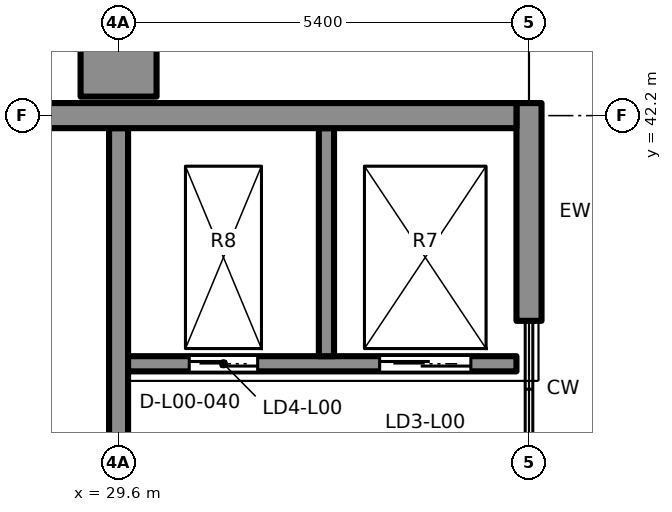
"""IFC4 building model, lengths in metres.
Left out: names, types, materials, properties, quantities, classifications, styles, units other than length and angle.
Written with IfcOpenShell. Run it as: python <this file> out.ifc"""

import sys

from ifc_helpers import new_model, si_unit, direction, frame, frame_2d, origin, place, context, subcontext, project, spatial, rectangle, extrude, element, fill, save


model = new_model("IFC4")
c1 = context("Model", 3, precision=1e-05, world=origin(), true_north=direction((0.0, 1.0)))
c2 = subcontext(c1, "Body", "Model", "MODEL_VIEW")
j1 = project(units=[si_unit("LENGTHUNIT", "METRE"), si_unit("PLANEANGLEUNIT", "RADIAN")], contexts=[c1])
p1 = place(None, origin())
s1 = spatial("IfcSite", under=j1, at=p1, CompositionType="ELEMENT")
p2 = place(p1, origin())
s2 = spatial("IfcBuilding", under=s1, at=p2, CompositionType="ELEMENT")
p3 = place(p2, origin())
s3 = spatial("IfcBuildingStorey", under=s2, at=p3, CompositionType="ELEMENT", Elevation=0.0)
p4 = place(p3, frame((29.6, 35.25, -1.4), z_axis=(0.0, 0.0, 1.0), x_axis=(0.0, 1.0, 0.0)))
e1 = element("IfcWall", 1, at=p4, inside=s3, PredefinedType="SHEAR", context=c2, shape_type="SweptSolid", body=[
    extrude(rectangle(XDim=6.785, YDim=0.25, at=frame_2d((3.393, 0.0))), origin(), (0.0, 0.0, 1.0), 7.45),
])
p5 = place(p4, frame((0.83, 0.0, 1.4)))
e2 = element("IfcOpeningElement", 2, at=p5, cuts=e1, PredefinedType="OPENING", context=c2, shape_type="SweptSolid", body=[
    extrude(rectangle(XDim=1.8, YDim=2.1, at=frame_2d((0.9, 1.05))), frame((0.0, 0.135, 0.0), z_axis=(0.0, -1.0, 0.0), x_axis=(1.0, 0.0, 0.0)), (0.0, 0.0, 1.0), 0.27),
])
p6 = place(p3, frame((29.725, 38.935, -1.4), z_axis=(0.0, 0.0, 1.0), x_axis=(1.0, 0.0, 0.0)))
e3 = element("IfcWall", 3, at=p6, inside=s3, PredefinedType="SHEAR", context=c2, shape_type="SweptSolid", body=[
    extrude(rectangle(XDim=5.11, YDim=0.2, at=frame_2d((2.555, 0.0))), origin(), (0.0, 0.0, 1.0), 7.45),
])
p7 = place(p6, frame((3.31, 0.0, 1.4)))
e4 = element("IfcOpeningElement", 4, at=p7, cuts=e3, PredefinedType="OPENING", context=c2, shape_type="SweptSolid", body=[
    extrude(rectangle(XDim=1.2, YDim=2.1, at=frame_2d((0.6, 1.05))), frame((0.0, 0.11, 0.0), z_axis=(0.0, -1.0, 0.0), x_axis=(1.0, 0.0, 0.0)), (0.0, 0.0, 1.0), 0.22),
])
p8 = place(p6, frame((0.805, 0.0, 1.4)))
e5 = element("IfcOpeningElement", 5, at=p8, cuts=e3, PredefinedType="OPENING", context=c2, shape_type="SweptSolid", body=[
    extrude(rectangle(XDim=0.9, YDim=2.1, at=frame_2d((0.45, 1.05))), frame((0.0, 0.11, 0.0), z_axis=(0.0, -1.0, 0.0), x_axis=(1.0, 0.0, 0.0)), (0.0, 0.0, 1.0), 0.22),
])
p9 = place(p3, frame((32.335, 42.035, -1.4), z_axis=(0.0, 0.0, 1.0), x_axis=(0.0, -1.0, 0.0)))
e6 = element("IfcWall", 6, at=p9, inside=s3, PredefinedType="SHEAR", context=c2, shape_type="SweptSolid", body=[
    extrude(rectangle(XDim=3.0, YDim=0.2, at=frame_2d((1.5, 0.0))), origin(), (0.0, 0.0, 1.0), 7.45),
])
p10 = place(p3, frame((29.725, 42.2, -1.4), z_axis=(0.0, 0.0, 1.0), x_axis=(1.0, 0.0, 0.0)))
e7 = element("IfcWall", 7, at=p10, inside=s3, PredefinedType="SHEAR", context=c2, shape_type="SweptSolid", body=[
    extrude(rectangle(XDim=5.11, YDim=0.25, at=frame_2d((2.555, 0.0))), origin(), (0.0, 0.0, 1.0), 1.4),
])
p11 = place(p3, frame((35.0, 38.835, -1.4), z_axis=(0.0, 0.0, 1.0), x_axis=(0.0, 1.0, 0.0)))
e8 = element("IfcWall", 8, at=p11, inside=s3, PredefinedType="SHEAR", context=c2, shape_type="SweptSolid", body=[
    extrude(rectangle(XDim=3.365, YDim=0.25, at=frame_2d((1.683, 0.0))), origin(), (0.0, 0.0, 1.0), 1.4),
])
p12 = place(p3, frame((35.0, 42.365, 0.0), z_axis=(0.0, 0.0, 1.0), x_axis=(0.0, -1.0, 0.0)))
e9 = element("IfcWall", 9, at=p12, inside=s3, PredefinedType="SOLIDWALL", context=c2, shape_type="SweptSolid", body=[
    extrude(rectangle(XDim=2.865, YDim=0.33, at=frame_2d((1.433, 0.0))), origin(), (0.0, 0.0, 1.0), 5.25),
])
p13 = place(p3, frame((23.92, 42.2, 0.0), z_axis=(0.0, 0.0, 1.0), x_axis=(1.0, 0.0, 0.0)))
e10 = element("IfcWall", 10, at=p13, inside=s3, PredefinedType="SOLIDWALL", context=c2, shape_type="SweptSolid", body=[
    extrude(rectangle(XDim=10.915, YDim=0.33, at=frame_2d((5.458, 0.0))), origin(), (0.0, 0.0, 1.0), 5.5),
])
p14 = place(p13, frame((3.28, 0.0, 0.0)))
e11 = element("IfcOpeningElement", 11, at=p14, cuts=e10, PredefinedType="OPENING", context=c2, shape_type="SweptSolid", body=[
    extrude(rectangle(XDim=1.2, YDim=2.1, at=frame_2d((0.6, 1.05))), frame((0.0, 0.175, 0.0), z_axis=(0.0, -1.0, 0.0), x_axis=(1.0, 0.0, 0.0)), (0.0, 0.0, 1.0), 0.35),
])
p15 = place(p3, frame((29.1, 42.825, 0.0), z_axis=(0.0, 0.0, 1.0), x_axis=(1.0, 0.0, 0.0)))
e12 = element("IfcWall", 12, at=p15, inside=s3, PredefinedType="SOLIDWALL", context=c2, shape_type="SweptSolid", body=[
    extrude(rectangle(XDim=1.0, YDim=0.75, at=frame_2d((0.5, 0.0))), origin(), (0.0, 0.0, 1.0), 6.3),
])
p16 = place(p7, origin())
e13 = element("IfcDoor", 13, at=p16, inside=s3, OperationType="DOUBLE_DOOR_SLIDING", PredefinedType="DOOR", context=c2, shape_type="SweptSolid", body=[
    extrude(rectangle(XDim=1.2, YDim=2.1, at=frame_2d((0.6, 1.05))), frame((0.0, 0.025, 0.0), z_axis=(0.0, -1.0, 0.0), x_axis=(1.0, 0.0, 0.0)), (0.0, 0.0, 1.0), 0.05),
])
fill(e4, e13)
p17 = place(p8, origin())
e14 = element("IfcDoor", 14, at=p17, inside=s3, OperationType="DOUBLE_DOOR_SLIDING", PredefinedType="DOOR", context=c2, shape_type="SweptSolid", body=[
    extrude(rectangle(XDim=0.9, YDim=2.1, at=frame_2d((0.45, 1.05))), frame((0.0, 0.025, 0.0), z_axis=(0.0, -1.0, 0.0), x_axis=(1.0, 0.0, 0.0)), (0.0, 0.0, 1.0), 0.05),
])
fill(e5, e14)
save(model, sys.argv[1])
